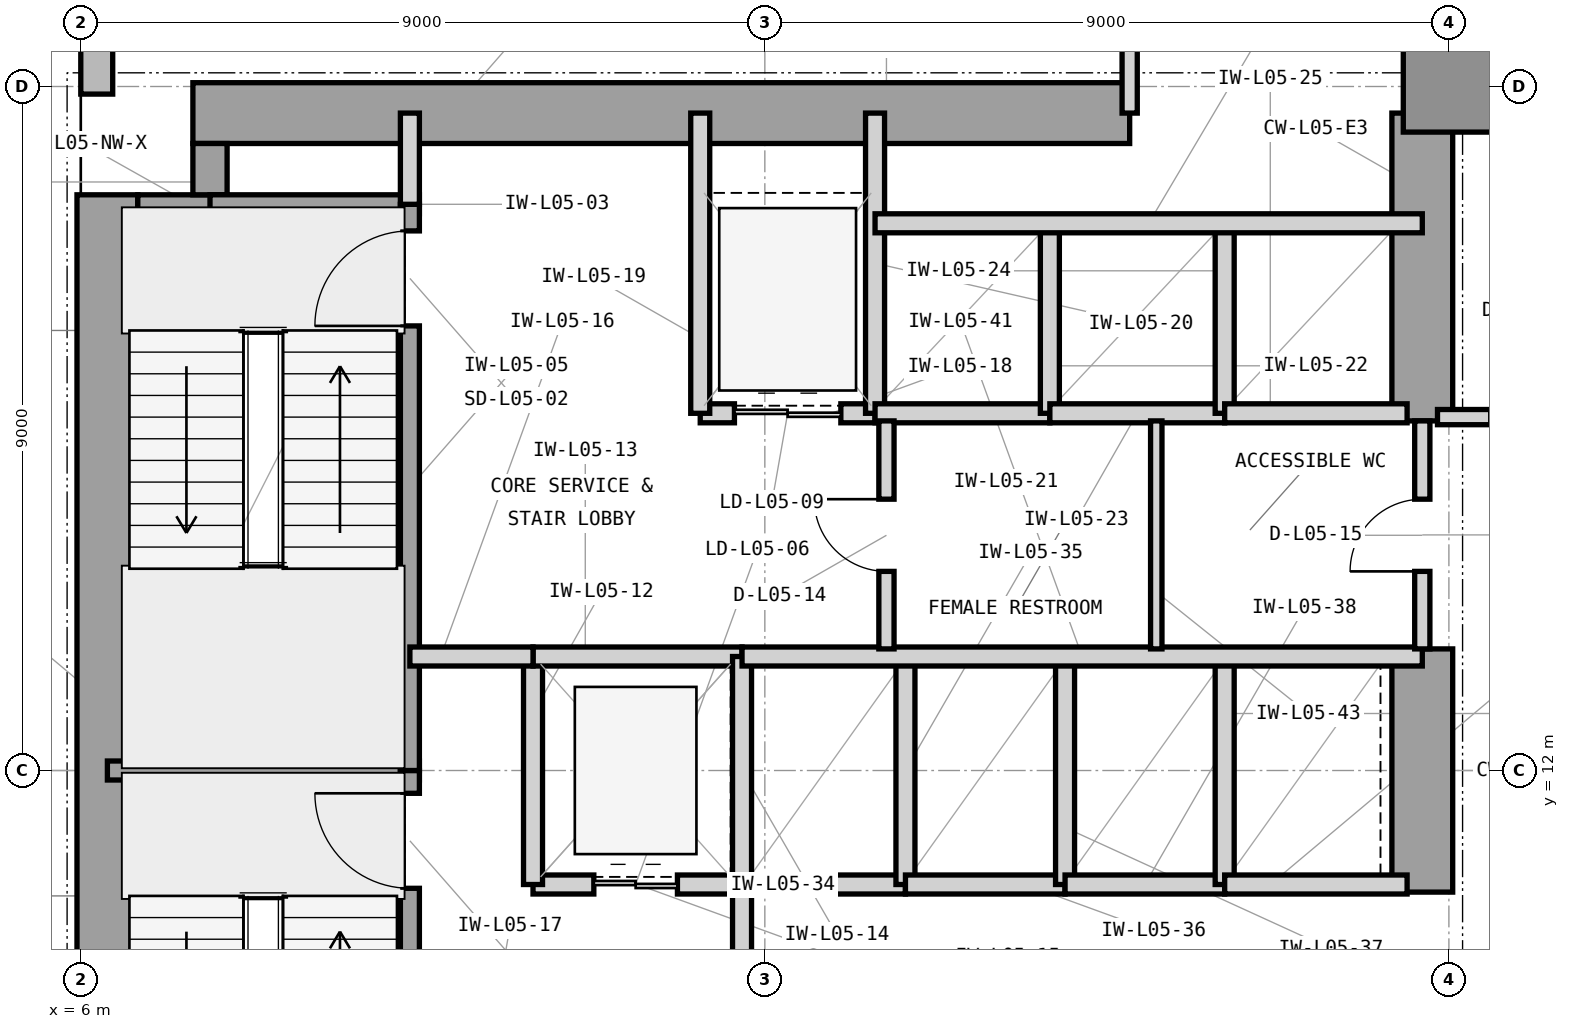
"""IFC4 building model, lengths in metres.
Left out: names, types, materials, properties, quantities, classifications, styles, units other than length and angle.
Written with IfcOpenShell. Run it as: python <this file> out.ifc"""

import sys

from ifc_helpers import new_model, si_unit, direction, frame, frame_2d, origin, origin_2d, place, context, subcontext, project, spatial, rectangle, extrude, element, fill, save


model = new_model("IFC4")
c1 = context("Model", 3, precision=1e-05, world=origin(), true_north=direction((0.0, 1.0)))
c2 = subcontext(c1, "Body", "Model", "MODEL_VIEW")
j1 = project(units=[si_unit("LENGTHUNIT", "METRE"), si_unit("PLANEANGLEUNIT", "RADIAN")], contexts=[c1])
p1 = place(None, origin())
s1 = spatial("IfcSite", under=j1, at=p1, CompositionType="ELEMENT")
p2 = place(p1, origin())
s2 = spatial("IfcBuilding", under=s1, at=p2, CompositionType="ELEMENT")
p3 = place(p2, frame((0.0, 0.0, 25.8)))
s3 = spatial("IfcBuildingStorey", under=s2, at=p3, CompositionType="ELEMENT", Elevation=25.8)
p4 = place(p3, frame((6.35, 4.425, 0.0), z_axis=(0.0, 0.0, 1.0), x_axis=(0.0, 1.0, 0.0)))
e1 = element("IfcWall", 1, at=p4, inside=s3, PredefinedType="SHEAR", context=c2, shape_type="SweptSolid", body=[
    extrude(rectangle(XDim=15.15, YDim=0.8, at=frame_2d((7.575, 0.0))), origin(), (0.0, 0.0, 1.0), 4.2),
])
p5 = place(p3, frame((7.475, 20.65, 0.0), z_axis=(0.0, 0.0, 1.0), x_axis=(1.0, 0.0, 0.0)))
e2 = element("IfcWall", 2, at=p5, inside=s3, PredefinedType="SHEAR", context=c2, shape_type="SweptSolid", body=[
    extrude(rectangle(XDim=12.325, YDim=0.8, at=frame_2d((6.163, 0.0))), origin(), (0.0, 0.0, 1.0), 4.2),
])
p6 = place(p3, frame((23.65, 10.4, 0.0), z_axis=(0.0, 0.0, 1.0), x_axis=(0.0, 1.0, 0.0)))
e3 = element("IfcWall", 3, at=p6, inside=s3, PredefinedType="SHEAR", context=c2, shape_type="SweptSolid", body=[
    extrude(rectangle(XDim=3.2, YDim=0.8, at=frame_2d((1.6, 0.0))), origin(), (0.0, 0.0, 1.0), 4.2),
])
p7 = place(p3, frame((23.65, 16.6, 0.0), z_axis=(0.0, 0.0, 1.0), x_axis=(0.0, 1.0, 0.0)))
e4 = element("IfcWall", 4, at=p7, inside=s3, PredefinedType="SHEAR", context=c2, shape_type="SweptSolid", body=[
    extrude(rectangle(XDim=4.05, YDim=0.8, at=frame_2d((2.025, 0.0))), origin(), (0.0, 0.0, 1.0), 4.2),
])
p8 = place(p3, frame((6.75, 19.35, 0.0), z_axis=(0.0, 0.0, 1.0), x_axis=(1.0, 0.0, 0.0)))
e5 = element("IfcWall", 5, at=p8, inside=s3, PredefinedType="SHEAR", context=c2, shape_type="SweptSolid", body=[
    extrude(rectangle(XDim=1.175, YDim=0.45, at=frame_2d((0.587, 0.0))), origin(), (0.0, 0.0, 1.0), 4.2),
])
p9 = place(p3, frame((7.7, 19.575, 0.0), z_axis=(0.0, 0.0, 1.0), x_axis=(0.0, 1.0, 0.0)))
e6 = element("IfcWall", 6, at=p9, inside=s3, PredefinedType="SHEAR", context=c2, shape_type="SweptSolid", body=[
    extrude(rectangle(XDim=0.675, YDim=0.45, at=frame_2d((0.337, 0.0))), origin(), (0.0, 0.0, 1.0), 4.2),
])
p10 = place(p3, frame((24.0, 21.0, 0.0), z_axis=(0.0, 0.0, 1.0), x_axis=(1.0, 0.0, 0.0)))
e7 = element("IfcColumn", 7, at=p10, inside=s3, PredefinedType="COLUMN", context=c2, shape_type="SweptSolid", body=[
    extrude(rectangle(XDim=1.2, YDim=1.2, at=origin_2d()), origin(), (0.0, 0.0, 1.0), 4.2),
])
p11 = place(p3, frame((23.79, 21.0, 0.0), z_axis=(0.0, 0.0, 1.0), x_axis=(0.0, 1.0, 0.0)))
e8 = element("IfcWall", 8, at=p11, inside=s3, PredefinedType="STANDARD", context=c2, shape_type="SweptSolid", body=[
    extrude(rectangle(XDim=28.4, YDim=0.42, at=frame_2d((14.2, 0.0))), origin(), (0.0, 0.0, 1.0), 3.98),
])
p12 = place(p11, frame((10.433, 0.0, 0.85)))
e9 = element("IfcOpeningElement", 9, at=p12, cuts=e8, PredefinedType="OPENING", context=c2, shape_type="SweptSolid", body=[
    extrude(rectangle(XDim=2.8, YDim=2.45, at=frame_2d((1.4, 1.225))), frame((0.0, 0.22, 0.0), z_axis=(0.0, -1.0, 0.0), x_axis=(1.0, 0.0, 0.0)), (0.0, 0.0, 1.0), 0.44),
])
p13 = place(p11, frame((21.966, 0.0, 0.85)))
e10 = element("IfcOpeningElement", 10, at=p13, cuts=e8, PredefinedType="OPENING", context=c2, shape_type="SweptSolid", body=[
    extrude(rectangle(XDim=1.2, YDim=2.45, at=frame_2d((0.6, 1.225))), frame((0.0, 0.22, 0.0), z_axis=(0.0, -1.0, 0.0), x_axis=(1.0, 0.0, 0.0)), (0.0, 0.0, 1.0), 0.44),
])
p14 = place(p3, frame((6.21, 49.4, 0.0), z_axis=(0.0, 0.0, 1.0), x_axis=(0.0, -1.0, 0.0)))
e11 = element("IfcWall", 11, at=p14, inside=s3, PredefinedType="STANDARD", context=c2, shape_type="SweptSolid", body=[
    extrude(rectangle(XDim=28.5, YDim=0.42, at=frame_2d((14.25, 0.0))), origin(), (0.0, 0.0, 1.0), 3.98),
])
p15 = place(p14, frame((15.225, 0.0, 0.85)))
e12 = element("IfcOpeningElement", 12, at=p15, cuts=e11, PredefinedType="OPENING", context=c2, shape_type="SweptSolid", body=[
    extrude(rectangle(XDim=2.8, YDim=2.45, at=frame_2d((1.4, 1.225))), frame((0.0, 0.22, 0.0), z_axis=(0.0, -1.0, 0.0), x_axis=(1.0, 0.0, 0.0)), (0.0, 0.0, 1.0), 0.44),
])
p16 = place(p14, frame((5.236, 0.0, 0.85)))
e13 = element("IfcOpeningElement", 13, at=p16, cuts=e11, PredefinedType="OPENING", context=c2, shape_type="SweptSolid", body=[
    extrude(rectangle(XDim=1.2, YDim=2.45, at=frame_2d((0.6, 1.225))), frame((0.0, 0.22, 0.0), z_axis=(0.0, -1.0, 0.0), x_axis=(1.0, 0.0, 0.0)), (0.0, 0.0, 1.0), 0.44),
])
p17 = place(p3, frame((6.35, 12.0, 0.0), z_axis=(0.0, 0.0, 1.0), x_axis=(1.0, 0.0, 0.0)))
e14 = element("IfcWall", 14, at=p17, inside=s3, PredefinedType="SHEAR", context=c2, shape_type="SweptSolid", body=[
    extrude(rectangle(XDim=4.105, YDim=0.25, at=frame_2d((2.052, 0.0))), origin(), (0.0, 0.0, 1.0), 4.2),
])
p18 = place(p3, frame((7.7, 19.45, 0.0), z_axis=(0.0, 0.0, 1.0), x_axis=(1.0, 0.0, 0.0)))
e15 = element("IfcWall", 15, at=p18, inside=s3, PredefinedType="SHEAR", context=c2, shape_type="SweptSolid", body=[
    extrude(rectangle(XDim=2.755, YDim=0.25, at=frame_2d((1.377, 0.0))), origin(), (0.0, 0.0, 1.0), 4.2),
])
p19 = place(p3, frame((10.33, 4.55, 0.0), z_axis=(0.0, 0.0, 1.0), x_axis=(0.0, 1.0, 0.0)))
e16 = element("IfcWall", 16, at=p19, inside=s3, PredefinedType="SHEAR", context=c2, shape_type="SweptSolid", body=[
    extrude(rectangle(XDim=7.45, YDim=0.25, at=frame_2d((3.725, 0.0))), origin(), (0.0, 0.0, 1.0), 4.2),
])
p20 = place(p19, frame((5.9, 0.0, 0.0)))
e17 = element("IfcOpeningElement", 17, at=p20, cuts=e16, PredefinedType="OPENING", context=c2, shape_type="SweptSolid", body=[
    extrude(rectangle(XDim=1.25, YDim=2.2, at=frame_2d((0.625, 1.1))), frame((0.0, 0.135, 0.0), z_axis=(0.0, -1.0, 0.0), x_axis=(1.0, 0.0, 0.0)), (0.0, 0.0, 1.0), 0.27),
])
p21 = place(p3, frame((10.33, 12.0, 0.0), z_axis=(0.0, 0.0, 1.0), x_axis=(0.0, 1.0, 0.0)))
e18 = element("IfcWall", 18, at=p21, inside=s3, PredefinedType="SHEAR", context=c2, shape_type="SweptSolid", body=[
    extrude(rectangle(XDim=7.45, YDim=0.25, at=frame_2d((3.725, 0.0))), origin(), (0.0, 0.0, 1.0), 4.2),
])
p22 = place(p21, frame((5.85, 0.0, 0.0)))
e19 = element("IfcOpeningElement", 19, at=p22, cuts=e18, PredefinedType="OPENING", context=c2, shape_type="SweptSolid", body=[
    extrude(rectangle(XDim=1.25, YDim=2.2, at=frame_2d((0.625, 1.1))), frame((0.0, 0.135, 0.0), z_axis=(0.0, -1.0, 0.0), x_axis=(1.0, 0.0, 0.0)), (0.0, 0.0, 1.0), 0.27),
])
p23 = place(p3, frame((10.33, 19.45, 0.0), z_axis=(0.0, 0.0, 1.0), x_axis=(0.0, 1.0, 0.0)))
e20 = element("IfcWall", 20, at=p23, inside=s3, PredefinedType="PARTITIONING", context=c2, shape_type="SweptSolid", body=[
    extrude(rectangle(XDim=1.2, YDim=0.25, at=frame_2d((0.6, 0.0))), origin(), (0.0, 0.0, 1.0), 3.114),
])
p24 = place(p3, frame((11.95, 10.5, 0.0), z_axis=(0.0, 0.0, 1.0), x_axis=(1.0, 0.0, 0.0)))
e21 = element("IfcWall", 21, at=p24, inside=s3, PredefinedType="PARTITIONING", context=c2, shape_type="SweptSolid", body=[
    extrude(rectangle(XDim=2.75, YDim=0.25, at=frame_2d((1.375, 0.0))), origin(), (0.0, 0.0, 1.0), 3.426),
])
p25 = place(p24, frame((0.8, 0.0, 0.0)))
e22 = element("IfcOpeningElement", 22, at=p25, cuts=e21, PredefinedType="OPENING", context=c2, shape_type="SweptSolid", body=[
    extrude(rectangle(XDim=1.1, YDim=2.25, at=frame_2d((0.55, 1.125))), frame((0.0, 0.135, 0.0), z_axis=(0.0, -1.0, 0.0), x_axis=(1.0, 0.0, 0.0)), (0.0, 0.0, 1.0), 0.27),
])
p26 = place(p3, frame((11.95, 10.5, 0.0), z_axis=(0.0, 0.0, 1.0), x_axis=(0.0, 1.0, 0.0)))
e23 = element("IfcWall", 23, at=p26, inside=s3, PredefinedType="PARTITIONING", context=c2, shape_type="SweptSolid", body=[
    extrude(rectangle(XDim=3.0, YDim=0.25, at=frame_2d((1.5, 0.0))), origin(), (0.0, 0.0, 1.0), 3.97),
])
p27 = place(p3, frame((11.95, 13.5, 0.0), z_axis=(0.0, 0.0, 1.0), x_axis=(1.0, 0.0, 0.0)))
e24 = element("IfcWall", 24, at=p27, inside=s3, PredefinedType="PARTITIONING", context=c2, shape_type="SweptSolid", body=[
    extrude(rectangle(XDim=2.75, YDim=0.25, at=frame_2d((1.375, 0.0))), origin(), (0.0, 0.0, 1.0), 3.426),
])
p28 = place(p3, frame((14.7, 10.5, 0.0), z_axis=(0.0, 0.0, 1.0), x_axis=(0.0, 1.0, 0.0)))
e25 = element("IfcWall", 25, at=p28, inside=s3, PredefinedType="PARTITIONING", context=c2, shape_type="SweptSolid", body=[
    extrude(rectangle(XDim=3.0, YDim=0.25, at=frame_2d((1.5, 0.0))), origin(), (0.0, 0.0, 1.0), 3.97),
])
p29 = place(p3, frame((14.7, 6.7, 0.0), z_axis=(0.0, 0.0, 1.0), x_axis=(0.0, 1.0, 0.0)))
e26 = element("IfcWall", 26, at=p29, inside=s3, PredefinedType="PARTITIONING", context=c2, shape_type="SweptSolid", body=[
    extrude(rectangle(XDim=3.8, YDim=0.25, at=frame_2d((1.9, 0.0))), origin(), (0.0, 0.0, 1.0), 3.97),
])
p30 = place(p29, frame((1.3, 0.0, 0.0)))
e27 = element("IfcOpeningElement", 27, at=p30, cuts=e26, PredefinedType="OPENING", context=c2, shape_type="SweptSolid", body=[
    extrude(rectangle(XDim=1.2, YDim=2.2, at=frame_2d((0.6, 1.1))), frame((0.0, 0.135, 0.0), z_axis=(0.0, -1.0, 0.0), x_axis=(1.0, 0.0, 0.0)), (0.0, 0.0, 1.0), 0.27),
])
p31 = place(p3, frame((10.33, 13.5, 0.0), z_axis=(0.0, 0.0, 1.0), x_axis=(1.0, 0.0, 0.0)))
e28 = element("IfcWall", 28, at=p31, inside=s3, PredefinedType="PARTITIONING", context=c2, shape_type="SweptSolid", body=[
    extrude(rectangle(XDim=1.62, YDim=0.25, at=frame_2d((0.81, 0.0))), origin(), (0.0, 0.0, 1.0), 3.426),
])
p32 = place(p3, frame((14.15, 16.7, 0.0), z_axis=(0.0, 0.0, 1.0), x_axis=(1.0, 0.0, 0.0)))
e29 = element("IfcWall", 29, at=p32, inside=s3, PredefinedType="PARTITIONING", context=c2, shape_type="SweptSolid", body=[
    extrude(rectangle(XDim=2.3, YDim=0.25, at=frame_2d((1.15, 0.0))), origin(), (0.0, 0.0, 1.0), 3.426),
])
p33 = place(p32, frame((0.45, 0.0, 0.0)))
e30 = element("IfcOpeningElement", 30, at=p33, cuts=e29, PredefinedType="OPENING", context=c2, shape_type="SweptSolid", body=[
    extrude(rectangle(XDim=1.4, YDim=2.35, at=frame_2d((0.7, 1.175))), frame((0.0, 0.135, 0.0), z_axis=(0.0, -1.0, 0.0), x_axis=(1.0, 0.0, 0.0)), (0.0, 0.0, 1.0), 0.27),
])
for number, where, z_axis, x_axis in (
    (31, (14.15, 16.7, 0.0), (0.0, 0.0, 1.0), (0.0, 1.0, 0.0)),
    (32, (16.45, 16.7, 0.0), (0.0, 0.0, 1.0), (0.0, 1.0, 0.0)),
):
    element("IfcWall", number, at=place(p3, frame(where, z_axis=z_axis, x_axis=x_axis)), inside=s3, PredefinedType="PARTITIONING", context=c2, shape_type="SweptSolid", body=[
        extrude(rectangle(XDim=3.95, YDim=0.25, at=frame_2d((1.975, 0.0))), origin(), (0.0, 0.0, 1.0), 3.97),
    ])
p34 = place(p3, frame((16.45, 16.7, 0.0), z_axis=(0.0, 0.0, 1.0), x_axis=(1.0, 0.0, 0.0)))
e33 = element("IfcWall", 33, at=p34, inside=s3, PredefinedType="PARTITIONING", context=c2, shape_type="SweptSolid", body=[
    extrude(rectangle(XDim=2.3, YDim=0.25, at=frame_2d((1.15, 0.0))), origin(), (0.0, 0.0, 1.0), 3.426),
])
p35 = place(p3, frame((18.75, 16.7, 0.0), z_axis=(0.0, 0.0, 1.0), x_axis=(0.0, 1.0, 0.0)))
e34 = element("IfcWall", 34, at=p35, inside=s3, PredefinedType="PARTITIONING", context=c2, shape_type="SweptSolid", body=[
    extrude(rectangle(XDim=2.5, YDim=0.25, at=frame_2d((1.25, 0.0))), origin(), (0.0, 0.0, 1.0), 3.97),
])
p36 = place(p3, frame((18.75, 16.7, 0.0), z_axis=(0.0, 0.0, 1.0), x_axis=(1.0, 0.0, 0.0)))
e35 = element("IfcWall", 35, at=p36, inside=s3, PredefinedType="PARTITIONING", context=c2, shape_type="SweptSolid", body=[
    extrude(rectangle(XDim=2.3, YDim=0.25, at=frame_2d((1.15, 0.0))), origin(), (0.0, 0.0, 1.0), 3.426),
])
p37 = place(p3, frame((21.05, 16.7, 0.0), z_axis=(0.0, 0.0, 1.0), x_axis=(0.0, 1.0, 0.0)))
e36 = element("IfcWall", 36, at=p37, inside=s3, PredefinedType="PARTITIONING", context=c2, shape_type="SweptSolid", body=[
    extrude(rectangle(XDim=2.5, YDim=0.25, at=frame_2d((1.25, 0.0))), origin(), (0.0, 0.0, 1.0), 3.97),
])
p38 = place(p3, frame((21.05, 16.7, 0.0), z_axis=(0.0, 0.0, 1.0), x_axis=(1.0, 0.0, 0.0)))
e37 = element("IfcWall", 37, at=p38, inside=s3, PredefinedType="PARTITIONING", context=c2, shape_type="SweptSolid", body=[
    extrude(rectangle(XDim=2.4, YDim=0.25, at=frame_2d((1.2, 0.0))), origin(), (0.0, 0.0, 1.0), 3.426),
])
p39 = place(p3, frame((16.45, 19.2, 0.0), z_axis=(0.0, 0.0, 1.0), x_axis=(1.0, 0.0, 0.0)))
e38 = element("IfcWall", 38, at=p39, inside=s3, PredefinedType="PARTITIONING", context=c2, shape_type="SweptSolid", body=[
    extrude(rectangle(XDim=7.2, YDim=0.25, at=frame_2d((3.6, 0.0))), origin(), (0.0, 0.0, 1.0), 3.97),
])
p40 = place(p3, frame((14.7, 10.5, 0.0), z_axis=(0.0, 0.0, 1.0), x_axis=(1.0, 0.0, 0.0)))
e39 = element("IfcWall", 39, at=p40, inside=s3, PredefinedType="PARTITIONING", context=c2, shape_type="SweptSolid", body=[
    extrude(rectangle(XDim=2.15, YDim=0.25, at=frame_2d((1.075, 0.0))), origin(), (0.0, 0.0, 1.0), 3.426),
])
p41 = place(p3, frame((16.85, 10.5, 0.0), z_axis=(0.0, 0.0, 1.0), x_axis=(0.0, 1.0, 0.0)))
e40 = element("IfcWall", 40, at=p41, inside=s3, PredefinedType="PARTITIONING", context=c2, shape_type="SweptSolid", body=[
    extrude(rectangle(XDim=3.0, YDim=0.25, at=frame_2d((1.5, 0.0))), origin(), (0.0, 0.0, 1.0), 3.97),
])
p42 = place(p3, frame((16.85, 10.5, 0.0), z_axis=(0.0, 0.0, 1.0), x_axis=(1.0, 0.0, 0.0)))
e41 = element("IfcWall", 41, at=p42, inside=s3, PredefinedType="PARTITIONING", context=c2, shape_type="SweptSolid", body=[
    extrude(rectangle(XDim=2.1, YDim=0.25, at=frame_2d((1.05, 0.0))), origin(), (0.0, 0.0, 1.0), 3.426),
])
p43 = place(p3, frame((18.95, 10.5, 0.0), z_axis=(0.0, 0.0, 1.0), x_axis=(0.0, 1.0, 0.0)))
e42 = element("IfcWall", 42, at=p43, inside=s3, PredefinedType="PARTITIONING", context=c2, shape_type="SweptSolid", body=[
    extrude(rectangle(XDim=3.0, YDim=0.25, at=frame_2d((1.5, 0.0))), origin(), (0.0, 0.0, 1.0), 3.97),
])
p44 = place(p3, frame((18.95, 10.5, 0.0), z_axis=(0.0, 0.0, 1.0), x_axis=(1.0, 0.0, 0.0)))
e43 = element("IfcWall", 43, at=p44, inside=s3, PredefinedType="PARTITIONING", context=c2, shape_type="SweptSolid", body=[
    extrude(rectangle(XDim=2.1, YDim=0.25, at=frame_2d((1.05, 0.0))), origin(), (0.0, 0.0, 1.0), 3.426),
])
p45 = place(p3, frame((21.05, 10.5, 0.0), z_axis=(0.0, 0.0, 1.0), x_axis=(0.0, 1.0, 0.0)))
e44 = element("IfcWall", 44, at=p45, inside=s3, PredefinedType="PARTITIONING", context=c2, shape_type="SweptSolid", body=[
    extrude(rectangle(XDim=3.0, YDim=0.25, at=frame_2d((1.5, 0.0))), origin(), (0.0, 0.0, 1.0), 3.97),
])
p46 = place(p3, frame((21.05, 10.5, 0.0), z_axis=(0.0, 0.0, 1.0), x_axis=(1.0, 0.0, 0.0)))
e45 = element("IfcWall", 45, at=p46, inside=s3, PredefinedType="PARTITIONING", context=c2, shape_type="SweptSolid", body=[
    extrude(rectangle(XDim=2.4, YDim=0.25, at=frame_2d((1.2, 0.0))), origin(), (0.0, 0.0, 1.0), 3.426),
])
p47 = place(p3, frame((14.7, 13.5, 0.0), z_axis=(0.0, 0.0, 1.0), x_axis=(1.0, 0.0, 0.0)))
e46 = element("IfcWall", 46, at=p47, inside=s3, PredefinedType="PARTITIONING", context=c2, shape_type="SweptSolid", body=[
    extrude(rectangle(XDim=8.95, YDim=0.25, at=frame_2d((4.475, 0.0))), origin(), (0.0, 0.0, 1.0), 3.426),
])
p48 = place(p3, frame((16.6, 13.6, 0.0), z_axis=(0.0, 0.0, 1.0), x_axis=(0.0, 1.0, 0.0)))
e47 = element("IfcWall", 47, at=p48, inside=s3, PredefinedType="PARTITIONING", context=c2, shape_type="SweptSolid", body=[
    extrude(rectangle(XDim=3.0, YDim=0.2, at=frame_2d((1.5, 0.0))), origin(), (0.0, 0.0, 1.0), 3.97),
])
p49 = place(p48, frame((1.02, 0.0, 0.0)))
e48 = element("IfcOpeningElement", 48, at=p49, cuts=e47, PredefinedType="OPENING", context=c2, shape_type="SweptSolid", body=[
    extrude(rectangle(XDim=0.95, YDim=2.1, at=frame_2d((0.475, 1.05))), frame((0.0, 0.11, 0.0), z_axis=(0.0, -1.0, 0.0), x_axis=(1.0, 0.0, 0.0)), (0.0, 0.0, 1.0), 0.22),
])
p50 = place(p3, frame((20.15, 13.6, 0.0), z_axis=(0.0, 0.0, 1.0), x_axis=(0.0, 1.0, 0.0)))
e49 = element("IfcWall", 49, at=p50, inside=s3, PredefinedType="PARTITIONING", context=c2, shape_type="SweptSolid", body=[
    extrude(rectangle(XDim=3.0, YDim=0.15, at=frame_2d((1.5, 0.0))), origin(), (0.0, 0.0, 1.0), 3.97),
])
p51 = place(p3, frame((23.65, 13.6, 0.0), z_axis=(0.0, 0.0, 1.0), x_axis=(0.0, 1.0, 0.0)))
e50 = element("IfcWall", 50, at=p51, inside=s3, PredefinedType="PARTITIONING", context=c2, shape_type="SweptSolid", body=[
    extrude(rectangle(XDim=3.0, YDim=0.2, at=frame_2d((1.5, 0.0))), origin(), (0.0, 0.0, 1.0), 3.97),
])
p52 = place(p51, frame((1.02, 0.0, 0.0)))
e51 = element("IfcOpeningElement", 51, at=p52, cuts=e50, PredefinedType="OPENING", context=c2, shape_type="SweptSolid", body=[
    extrude(rectangle(XDim=0.95, YDim=2.1, at=frame_2d((0.475, 1.05))), frame((0.0, 0.11, 0.0), z_axis=(0.0, -1.0, 0.0), x_axis=(1.0, 0.0, 0.0)), (0.0, 0.0, 1.0), 0.22),
])
p53 = place(p3, frame((23.85, 16.65, 0.0), z_axis=(0.0, 0.0, 1.0), x_axis=(1.0, 0.0, 0.0)))
e52 = element("IfcWall", 52, at=p53, inside=s3, PredefinedType="PARTITIONING", context=c2, shape_type="SweptSolid", body=[
    extrude(rectangle(XDim=2.85, YDim=0.2, at=frame_2d((1.425, 0.0))), origin(), (0.0, 0.0, 1.0), 3.97),
])
p54 = place(p53, frame((0.7, 0.0, 0.0)))
e53 = element("IfcOpeningElement", 53, at=p54, cuts=e52, PredefinedType="OPENING", context=c2, shape_type="SweptSolid", body=[
    extrude(rectangle(XDim=1.0, YDim=2.15, at=frame_2d((0.5, 1.075))), frame((0.0, 0.11, 0.0), z_axis=(0.0, -1.0, 0.0), x_axis=(1.0, 0.0, 0.0)), (0.0, 0.0, 1.0), 0.22),
])
p55 = place(p3, frame((19.8, 20.65, 0.0), z_axis=(0.0, 0.0, 1.0), x_axis=(0.0, 1.0, 0.0)))
e54 = element("IfcWall", 54, at=p55, inside=s3, PredefinedType="PARTITIONING", context=c2, shape_type="SweptSolid", body=[
    extrude(rectangle(XDim=6.15, YDim=0.2, at=frame_2d((3.075, 0.0))), origin(), (0.0, 0.0, 1.0), 3.97),
])
p56 = place(p20, origin())
e55 = element("IfcDoor", 55, at=p56, inside=s3, OperationType="SINGLE_SWING_RIGHT", PredefinedType="DOOR", context=c2, shape_type="SweptSolid", body=[
    extrude(rectangle(XDim=1.25, YDim=2.2, at=frame_2d((0.625, 1.1))), frame((0.0, 0.025, 0.0), z_axis=(0.0, -1.0, 0.0), x_axis=(1.0, 0.0, 0.0)), (0.0, 0.0, 1.0), 0.05),
])
fill(e17, e55)
p57 = place(p22, origin())
e56 = element("IfcDoor", 56, at=p57, inside=s3, OperationType="SINGLE_SWING_LEFT", PredefinedType="DOOR", context=c2, shape_type="SweptSolid", body=[
    extrude(rectangle(XDim=1.25, YDim=2.2, at=frame_2d((0.625, 1.1))), frame((0.0, 0.025, 0.0), z_axis=(0.0, -1.0, 0.0), x_axis=(1.0, 0.0, 0.0)), (0.0, 0.0, 1.0), 0.05),
])
fill(e19, e56)
p58 = place(p25, origin())
e57 = element("IfcDoor", 57, at=p58, inside=s3, OperationType="DOUBLE_DOOR_SLIDING", PredefinedType="DOOR", context=c2, shape_type="SweptSolid", body=[
    extrude(rectangle(XDim=1.1, YDim=2.25, at=frame_2d((0.55, 1.125))), frame((0.0, 0.025, 0.0), z_axis=(0.0, -1.0, 0.0), x_axis=(1.0, 0.0, 0.0)), (0.0, 0.0, 1.0), 0.05),
])
fill(e22, e57)
p59 = place(p33, origin())
e58 = element("IfcDoor", 58, at=p59, inside=s3, OperationType="DOUBLE_DOOR_SLIDING", PredefinedType="DOOR", context=c2, shape_type="SweptSolid", body=[
    extrude(rectangle(XDim=1.4, YDim=2.35, at=frame_2d((0.7, 1.175))), frame((0.0, 0.025, 0.0), z_axis=(0.0, -1.0, 0.0), x_axis=(1.0, 0.0, 0.0)), (0.0, 0.0, 1.0), 0.05),
])
fill(e30, e58)
p60 = place(p49, origin())
e59 = element("IfcDoor", 59, at=p60, inside=s3, OperationType="SINGLE_SWING_RIGHT", PredefinedType="DOOR", context=c2, shape_type="SweptSolid", body=[
    extrude(rectangle(XDim=0.95, YDim=2.1, at=frame_2d((0.475, 1.05))), frame((0.0, 0.025, 0.0), z_axis=(0.0, -1.0, 0.0), x_axis=(1.0, 0.0, 0.0)), (0.0, 0.0, 1.0), 0.05),
])
fill(e48, e59)
p61 = place(p52, origin())
e60 = element("IfcDoor", 60, at=p61, inside=s3, OperationType="SINGLE_SWING_LEFT", PredefinedType="DOOR", context=c2, shape_type="SweptSolid", body=[
    extrude(rectangle(XDim=0.95, YDim=2.1, at=frame_2d((0.475, 1.05))), frame((0.0, 0.025, 0.0), z_axis=(0.0, -1.0, 0.0), x_axis=(1.0, 0.0, 0.0)), (0.0, 0.0, 1.0), 0.05),
])
fill(e51, e60)
save(model, sys.argv[1])
